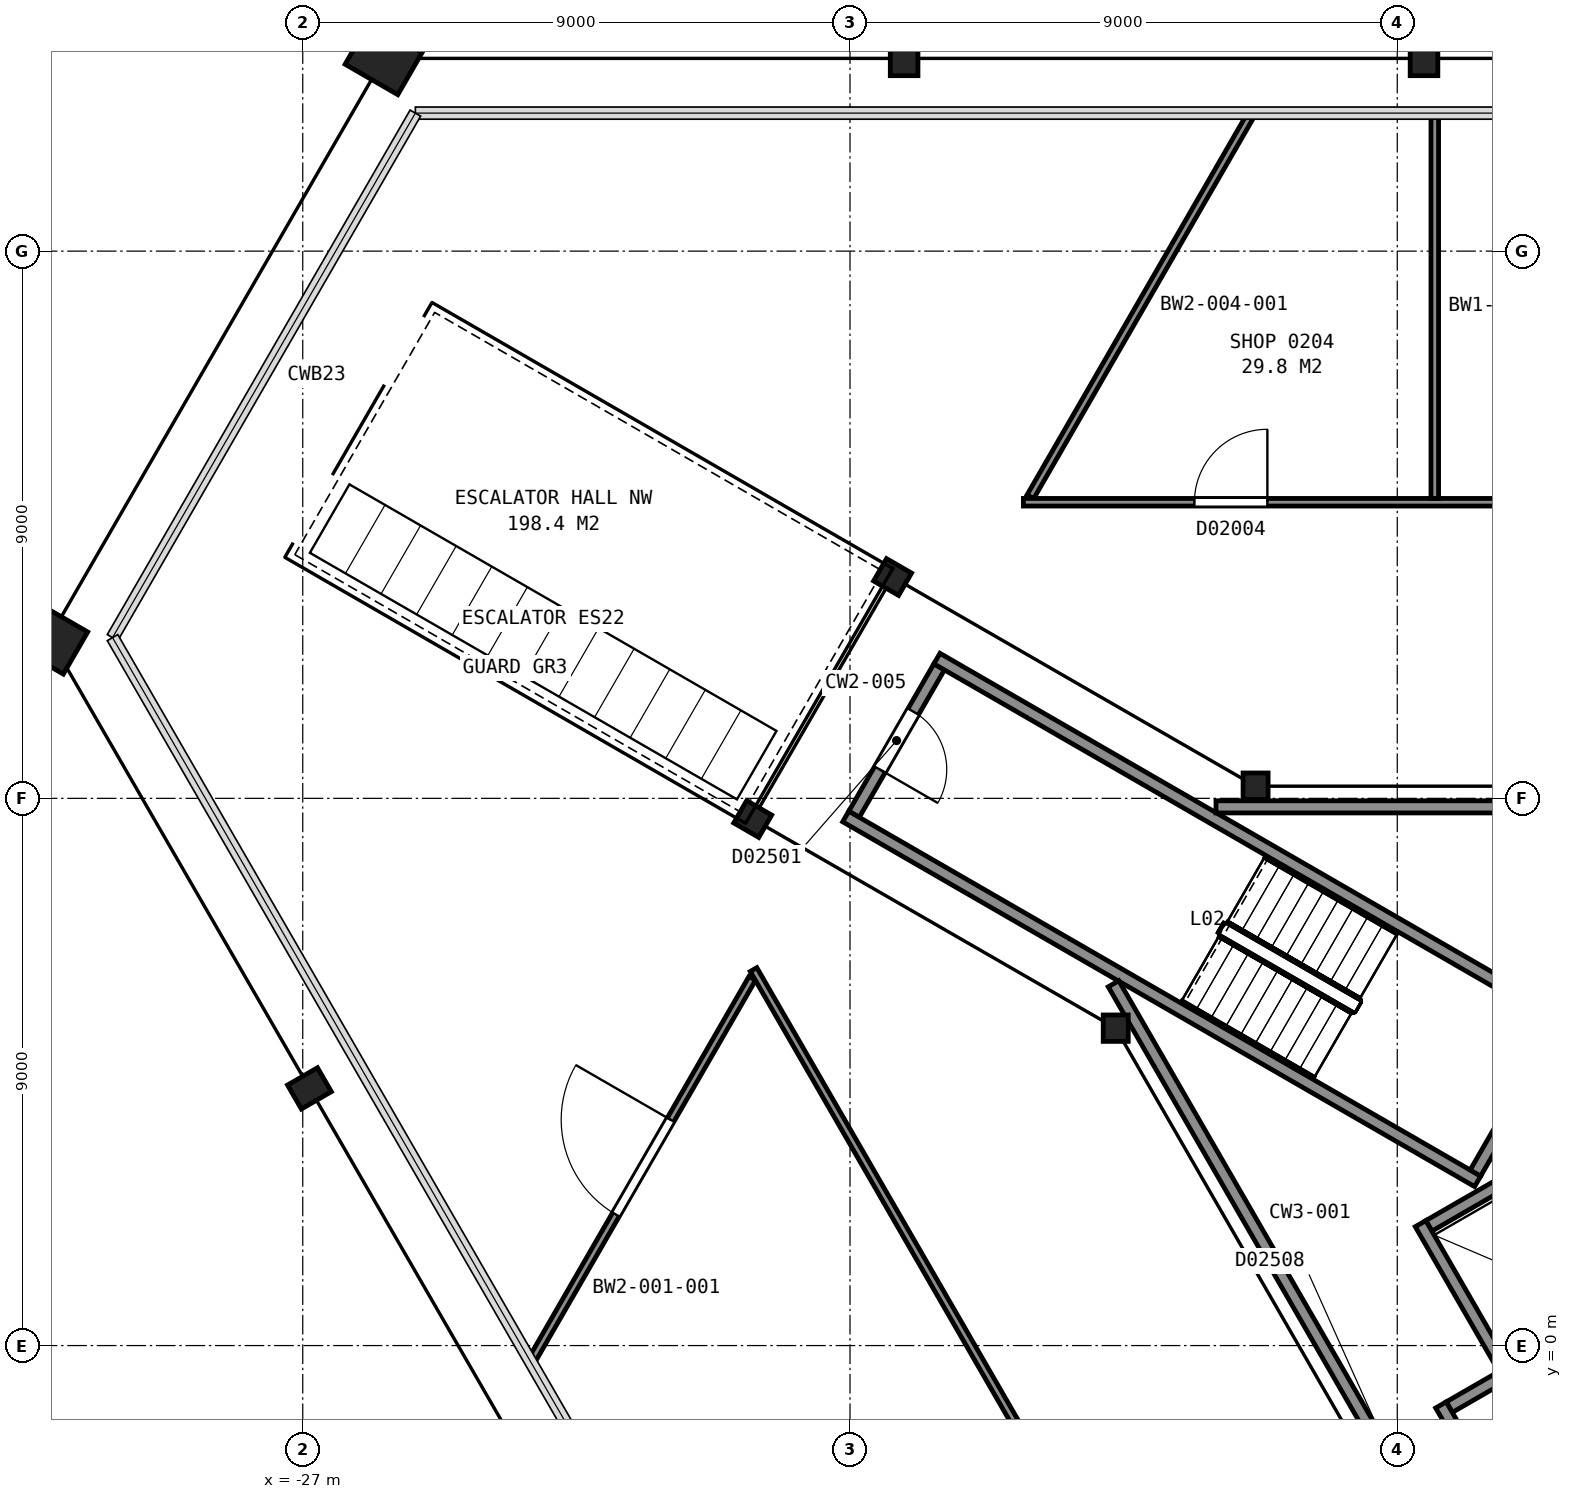
"""IFC4 building model, lengths in metres.
Left out: names, types, materials, properties, quantities, classifications, styles, units other than length and angle.
Written with IfcOpenShell. Run it as: python <this file> out.ifc"""

import sys

from ifc_helpers import new_model, si_unit, direction, frame, frame_2d, origin, origin_2d, place, context, subcontext, project, spatial, rectangle, hollow_rectangle, i_section, extrude, element, fill, save


model = new_model("IFC4")
c1 = context("Model", 3, precision=1e-05, world=origin(), true_north=direction((0.0, 1.0)))
c2 = subcontext(c1, "Body", "Model", "MODEL_VIEW")
j1 = project(units=[si_unit("LENGTHUNIT", "METRE"), si_unit("PLANEANGLEUNIT", "RADIAN")], contexts=[c1])
p1 = place(None, origin())
s1 = spatial("IfcSite", under=j1, at=p1, CompositionType="ELEMENT")
p2 = place(p1, origin())
s2 = spatial("IfcBuilding", under=s1, at=p2, CompositionType="ELEMENT")
p3 = place(p2, frame((0.0, 0.0, 17.4)))
s3 = spatial("IfcBuildingStorey", under=s2, at=p3, CompositionType="ELEMENT", Elevation=17.4)
for number, where, z_axis, x_axis in (
    (1, (-8.56, 21.17, -0.16), (0.0, 0.0, 1.0), (1.0, 0.0, 0.0)),
    (2, (-17.11, 21.17, -0.16), (0.0, 0.0, 1.0), (1.0, 0.0, 0.0)),
):
    element("IfcColumn", number, at=place(p3, frame(where, z_axis=z_axis, x_axis=x_axis)), inside=s3, PredefinedType="COLUMN", context=c2, shape_type="SweptSolid", body=[
        extrude(i_section(OverallWidth=0.455, OverallDepth=0.569, WebThickness=0.078, FlangeThickness=0.125, FilletRadius=0.015, at=origin_2d()), origin(), (0.0, 0.0, 1.0), 5.16),
    ])
for number, where, z_axis, x_axis in (
    (3, (-25.67, 21.17, 0.0), (0.0, 0.0, 1.0), (0.5, 0.866, 0.0)),
    (4, (-31.17, 11.64, 0.0), (0.0, 0.0, 1.0), (0.5, 0.866, 0.0)),
):
    element("IfcColumn", number, at=place(p3, frame(where, z_axis=z_axis, x_axis=x_axis)), inside=s3, PredefinedType="COLUMN", context=c2, shape_type="SweptSolid", body=[
        extrude(hollow_rectangle(XDim=0.8, YDim=1.0, WallThickness=0.075, at=origin_2d()), origin(), (0.0, 0.0, 1.0), 5.0),
    ])
p4 = place(p3, frame((-26.89, 4.23, -0.16), z_axis=(0.0, 0.0, 1.0), x_axis=(-0.5, 0.866025403784, 0.0)))
e5 = element("IfcColumn", 5, at=p4, inside=s3, PredefinedType="COLUMN", context=c2, shape_type="SweptSolid", body=[
    extrude(i_section(OverallWidth=0.455, OverallDepth=0.569, WebThickness=0.078, FlangeThickness=0.125, FilletRadius=0.015, at=origin_2d()), origin(), (0.0, 0.0, 1.0), 5.16),
])
p5 = place(p3, frame((-11.33, 9.2, 0.0), z_axis=(0.0, 0.0, 1.0), x_axis=(1.0, 0.0, 0.0)))
e6 = element("IfcColumn", 6, at=p5, inside=s3, PredefinedType="COLUMN", context=c2, shape_type="SweptSolid", body=[
    extrude(i_section(OverallWidth=0.411, OverallDepth=0.434, WebThickness=0.036, FlangeThickness=0.057, FilletRadius=0.015, at=origin_2d()), origin(), (0.0, 0.0, 1.0), 5.0),
])
for number, where, z_axis, x_axis in (
    (7, (-17.3, 12.64, 0.0), (0.0, 0.0, 1.0), (0.5, 0.866, 0.0)),
    (8, (-19.6, 8.66, 0.0), (0.0, 0.0, 1.0), (0.5, 0.866, 0.0)),
):
    element("IfcColumn", number, at=place(p3, frame(where, z_axis=z_axis, x_axis=x_axis)), inside=s3, PredefinedType="COLUMN", context=c2, shape_type="SweptSolid", body=[
        extrude(i_section(OverallWidth=0.424, OverallDepth=0.475, WebThickness=0.048, FlangeThickness=0.077, FilletRadius=0.015, at=origin_2d()), origin(), (0.0, 0.0, 1.0), 5.0),
    ])
p6 = place(p3, frame((-13.63, 5.22, 0.0), z_axis=(0.0, 0.0, 1.0), x_axis=(1.0, 0.0, 0.0)))
e9 = element("IfcColumn", 9, at=p6, inside=s3, PredefinedType="COLUMN", context=c2, shape_type="SweptSolid", body=[
    extrude(i_section(OverallWidth=0.411, OverallDepth=0.434, WebThickness=0.036, FlangeThickness=0.057, FilletRadius=0.015, at=origin_2d()), origin(), (0.0, 0.0, 1.0), 5.0),
])
p7 = place(p3, frame((-16.534, 11.162, 0.0), z_axis=(0.0, 0.0, 1.0), x_axis=(-0.49998411664, -0.866034573852, 0.0)))
e10 = element("IfcWall", 10, at=p7, inside=s3, PredefinedType="PARTITIONING", context=c2, shape_type="SweptSolid", body=[
    extrude(rectangle(XDim=2.8, YDim=0.2, at=frame_2d((1.4, 0.0))), origin(), (0.0, 0.0, 1.0), 4.75),
])
p8 = place(p7, frame((0.85, 0.0, 0.0)))
e11 = element("IfcOpeningElement", 11, at=p8, cuts=e10, PredefinedType="OPENING", context=c2, shape_type="SweptSolid", body=[
    extrude(rectangle(XDim=1.1, YDim=2.1, at=frame_2d((0.55, 1.05))), frame((0.0, 0.11, 0.0), z_axis=(0.0, -1.0, 0.0), x_axis=(1.0, 0.0, 0.0)), (0.0, 0.0, 1.0), 0.22),
])
for number, where, z_axis, x_axis in (
    (12, (-7.678, 2.701, 0.0), (0.0, 0.0, 1.0), (-0.866, 0.5, 0.0)),
    (13, (-6.178, 5.299, 0.0), (0.0, 0.0, 1.0), (-0.866, 0.5, 0.0)),
):
    element("IfcWall", number, at=place(p3, frame(where, z_axis=z_axis, x_axis=x_axis)), inside=s3, PredefinedType="PARTITIONING", context=c2, shape_type="SweptSolid", body=[
        extrude(rectangle(XDim=12.0, YDim=0.2, at=frame_2d((6.0, 0.0))), origin(), (0.0, 0.0, 1.0), 4.75),
    ])
p9 = place(p3, frame((-6.315, 5.262, 0.0), z_axis=(0.0, 0.0, 1.0), x_axis=(-0.500049511043, -0.865996816683, 0.0)))
e14 = element("IfcWall", 14, at=p9, inside=s3, PredefinedType="PARTITIONING", context=c2, shape_type="SweptSolid", body=[
    extrude(rectangle(XDim=2.8, YDim=0.2, at=frame_2d((1.4, 0.0))), origin(), (0.0, 0.0, 1.0), 4.75),
])
p10 = place(p3, frame((-8.145, -1.013, 0.0), z_axis=(0.0, 0.0, 1.0), x_axis=(0.866016494683, 0.500015430699, 0.0)))
e15 = element("IfcWall", 15, at=p10, inside=s3, PredefinedType="PARTITIONING", context=c2, shape_type="SweptSolid", body=[
    extrude(rectangle(XDim=3.15, YDim=0.2, at=frame_2d((1.575, 0.0))), origin(), (0.0, 0.0, 1.0), 5.0),
])
p11 = place(p3, frame((-8.48, 1.969, 0.0), z_axis=(0.0, 0.0, 1.0), x_axis=(0.866000020948, 0.500043961785, 0.0)))
e16 = element("IfcWall", 16, at=p11, inside=s3, PredefinedType="PARTITIONING", context=c2, shape_type="SweptSolid", body=[
    extrude(rectangle(XDim=1.95, YDim=0.2, at=frame_2d((0.975, 0.0))), origin(), (0.0, 0.0, 1.0), 5.0),
])
p12 = place(p3, frame((-7.242, -0.376, 0.0), z_axis=(0.0, 0.0, 1.0), x_axis=(-0.499996545922, 0.866027397988, 0.0)))
e17 = element("IfcWall", 17, at=p12, inside=s3, PredefinedType="PARTITIONING", context=c2, shape_type="SweptSolid", body=[
    extrude(rectangle(XDim=2.75, YDim=0.2, at=frame_2d((1.375, 0.0))), origin(), (0.0, 0.0, 1.0), 5.0),
])
p13 = place(p3, frame((-7.006, -3.185, 0.0), z_axis=(0.0, 0.0, 1.0), x_axis=(-0.499990435942, 0.866030925526, 0.0)))
e18 = element("IfcWall", 18, at=p13, inside=s3, PredefinedType="PARTITIONING", context=c2, shape_type="SweptSolid", body=[
    extrude(rectangle(XDim=2.55, YDim=0.2, at=frame_2d((1.275, 0.0))), origin(), (0.0, 0.0, 1.0), 5.0),
])
p14 = place(p3, frame((-13.666, 5.95, 0.0), z_axis=(0.0, 0.0, 1.0), x_axis=(0.499971736997, -0.866041720822, 0.0)))
e19 = element("IfcWall", 19, at=p14, inside=s3, PredefinedType="PARTITIONING", context=c2, shape_type="SweptSolid", body=[
    extrude(rectangle(XDim=14.949, YDim=0.2, at=frame_2d((7.475, 0.0))), origin(), (0.0, 0.0, 1.0), 4.75),
])
p15 = place(p14, frame((8.69, 0.0, 0.0)))
e20 = element("IfcOpeningElement", 20, at=p15, cuts=e19, PredefinedType="OPENING", context=c2, shape_type="SweptSolid", body=[
    extrude(rectangle(XDim=1.8, YDim=2.1, at=frame_2d((0.9, 1.05))), frame((0.0, 0.11, 0.0), z_axis=(0.0, -1.0, 0.0), x_axis=(1.0, 0.0, 0.0)), (0.0, 0.0, 1.0), 0.22),
])
p16 = place(p3, frame((11.986, 8.86, 0.0), z_axis=(0.0, 0.0, 1.0), x_axis=(-1.0, 0.0, 0.0)))
e21 = element("IfcWall", 21, at=p16, inside=s3, PredefinedType="PARTITIONING", context=c2, shape_type="SweptSolid", body=[
    extrude(rectangle(XDim=23.967, YDim=0.2, at=frame_2d((11.983, 0.0))), origin(), (0.0, 0.0, 1.0), 4.75),
])
p17 = place(p16, frame((7.596, 0.0, 0.0)))
e22 = element("IfcOpeningElement", 22, at=p17, cuts=e21, PredefinedType="OPENING", context=c2, shape_type="SweptSolid", body=[
    extrude(rectangle(XDim=1.8, YDim=2.1, at=frame_2d((0.9, 1.05))), frame((0.0, 0.11, 0.0), z_axis=(0.0, -1.0, 0.0), x_axis=(1.0, 0.0, 0.0)), (0.0, 0.0, 1.0), 0.22),
])
p18 = place(p3, frame((-19.607, 6.039, 0.0), z_axis=(0.0, 0.0, 1.0), x_axis=(-0.500002873931, -0.866023744513, 0.0)))
e23 = element("IfcWall", 23, at=p18, inside=s3, PredefinedType="PARTITIONING", context=c2, shape_type="SweptSolid", body=[
    extrude(rectangle(XDim=7.285, YDim=0.125, at=frame_2d((3.643, 0.0))), origin(), (0.0, 0.0, 1.0), 4.84),
])
p19 = place(p18, frame((2.685, 0.0, 0.0)))
e24 = element("IfcOpeningElement", 24, at=p19, cuts=e23, PredefinedType="OPENING", context=c2, shape_type="SweptSolid", body=[
    extrude(rectangle(XDim=1.8, YDim=2.4, at=frame_2d((0.9, 1.2))), frame((0.0, 0.073, 0.0), z_axis=(0.0, -1.0, 0.0), x_axis=(1.0, 0.0, 0.0)), (0.0, 0.0, 1.0), 0.145),
])
p20 = place(p3, frame((-4.438, -20.054, 0.0), z_axis=(0.0, 0.0, 1.0), x_axis=(-0.499994028088, 0.866028851642, 0.0)))
e25 = element("IfcWall", 25, at=p20, inside=s3, PredefinedType="PARTITIONING", context=c2, shape_type="SweptSolid", body=[
    extrude(rectangle(XDim=30.297, YDim=0.125, at=frame_2d((15.148, 0.0))), origin(), (0.0, 0.0, 1.0), 3.853),
])
p21 = place(p20, frame((10.349, 0.0, 0.0)))
e26 = element("IfcOpeningElement", 26, at=p21, cuts=e25, PredefinedType="OPENING", context=c2, shape_type="SweptSolid", body=[
    extrude(rectangle(XDim=1.2, YDim=2.1, at=frame_2d((0.6, 1.05))), frame((0.0, 0.073, 0.0), z_axis=(0.0, -1.0, 0.0), x_axis=(1.0, 0.0, 0.0)), (0.0, 0.0, 1.0), 0.145),
])
p22 = place(p20, frame((2.916, 0.0, 0.0)))
e27 = element("IfcOpeningElement", 27, at=p22, cuts=e25, PredefinedType="OPENING", context=c2, shape_type="SweptSolid", body=[
    extrude(rectangle(XDim=1.0, YDim=2.1, at=frame_2d((0.5, 1.05))), frame((0.0, 0.073, 0.0), z_axis=(0.0, -1.0, 0.0), x_axis=(1.0, 0.0, 0.0)), (0.0, 0.0, 1.0), 0.145),
])
p23 = place(p3, frame((-15.033, 13.961, 0.0), z_axis=(0.0, 0.0, 1.0), x_axis=(0.499977739203, 0.86603825568, 0.0)))
e28 = element("IfcWall", 28, at=p23, inside=s3, PredefinedType="PARTITIONING", context=c2, shape_type="SweptSolid", body=[
    extrude(rectangle(XDim=7.285, YDim=0.125, at=frame_2d((3.643, 0.0))), origin(), (0.0, 0.0, 1.0), 4.84),
])
p24 = place(p3, frame((-15.148, 13.87, 0.0), z_axis=(0.0, 0.0, 1.0), x_axis=(1.0, 0.0, 0.0)))
e29 = element("IfcWall", 29, at=p24, inside=s3, PredefinedType="PARTITIONING", context=c2, shape_type="SweptSolid", body=[
    extrude(rectangle(XDim=30.297, YDim=0.125, at=frame_2d((15.148, 0.0))), origin(), (0.0, 0.0, 1.0), 3.853),
])
p25 = place(p24, frame((26.281, 0.0, 0.0)))
e30 = element("IfcOpeningElement", 30, at=p25, cuts=e29, PredefinedType="OPENING", context=c2, shape_type="SweptSolid", body=[
    extrude(rectangle(XDim=1.2, YDim=2.1, at=frame_2d((0.6, 1.05))), frame((0.0, 0.073, 0.0), z_axis=(0.0, -1.0, 0.0), x_axis=(1.0, 0.0, 0.0)), (0.0, 0.0, 1.0), 0.145),
])
p26 = place(p24, frame((18.749, 0.0, 0.0)))
e31 = element("IfcOpeningElement", 31, at=p26, cuts=e29, PredefinedType="OPENING", context=c2, shape_type="SweptSolid", body=[
    extrude(rectangle(XDim=1.2, YDim=2.1, at=frame_2d((0.6, 1.05))), frame((0.0, 0.073, 0.0), z_axis=(0.0, -1.0, 0.0), x_axis=(1.0, 0.0, 0.0)), (0.0, 0.0, 1.0), 0.145),
])
p27 = place(p24, frame((10.365, 0.0, 0.0)))
e32 = element("IfcOpeningElement", 32, at=p27, cuts=e29, PredefinedType="OPENING", context=c2, shape_type="SweptSolid", body=[
    extrude(rectangle(XDim=1.2, YDim=2.1, at=frame_2d((0.6, 1.05))), frame((0.0, 0.073, 0.0), z_axis=(0.0, -1.0, 0.0), x_axis=(1.0, 0.0, 0.0)), (0.0, 0.0, 1.0), 0.145),
])
p28 = place(p24, frame((2.812, 0.0, 0.0)))
e33 = element("IfcOpeningElement", 33, at=p28, cuts=e29, PredefinedType="OPENING", context=c2, shape_type="SweptSolid", body=[
    extrude(rectangle(XDim=1.2, YDim=2.1, at=frame_2d((0.6, 1.05))), frame((0.0, 0.073, 0.0), z_axis=(0.0, -1.0, 0.0), x_axis=(1.0, 0.0, 0.0)), (0.0, 0.0, 1.0), 0.145),
])
p29 = place(p3, frame((-8.383, 13.933, 0.0), z_axis=(0.0, 0.0, 1.0), x_axis=(0.0, 1.0, 0.0)))
e34 = element("IfcWall", 34, at=p29, inside=s3, PredefinedType="PARTITIONING", context=c2, shape_type="SweptSolid", body=[
    extrude(rectangle(XDim=6.337, YDim=0.125, at=frame_2d((3.169, 0.0))), origin(), (0.0, 0.0, 1.0), 3.853),
])
p30 = place(p8, origin())
e35 = element("IfcDoor", 35, at=p30, inside=s3, OperationType="SINGLE_SWING_RIGHT", PredefinedType="DOOR", context=c2, shape_type="SweptSolid", body=[
    extrude(rectangle(XDim=1.1, YDim=2.1, at=frame_2d((0.55, 1.05))), frame((0.0, 0.025, 0.0), z_axis=(0.0, -1.0, 0.0), x_axis=(1.0, 0.0, 0.0)), (0.0, 0.0, 1.0), 0.05),
])
fill(e11, e35)
p31 = place(p19, origin())
e36 = element("IfcDoor", 36, at=p31, inside=s3, OperationType="DOUBLE_DOOR_SINGLE_SWING", PredefinedType="DOOR", context=c2, shape_type="SweptSolid", body=[
    extrude(rectangle(XDim=1.8, YDim=2.4, at=frame_2d((0.9, 1.2))), frame((0.0, 0.025, 0.0), z_axis=(0.0, -1.0, 0.0), x_axis=(1.0, 0.0, 0.0)), (0.0, 0.0, 1.0), 0.05),
])
fill(e24, e36)
p32 = place(p28, origin())
e37 = element("IfcDoor", 37, at=p32, inside=s3, OperationType="SINGLE_SWING_RIGHT", PredefinedType="DOOR", context=c2, shape_type="SweptSolid", body=[
    extrude(rectangle(XDim=1.2, YDim=2.1, at=frame_2d((0.6, 1.05))), frame((0.0, 0.025, 0.0), z_axis=(0.0, -1.0, 0.0), x_axis=(1.0, 0.0, 0.0)), (0.0, 0.0, 1.0), 0.05),
])
fill(e33, e37)
save(model, sys.argv[1])
